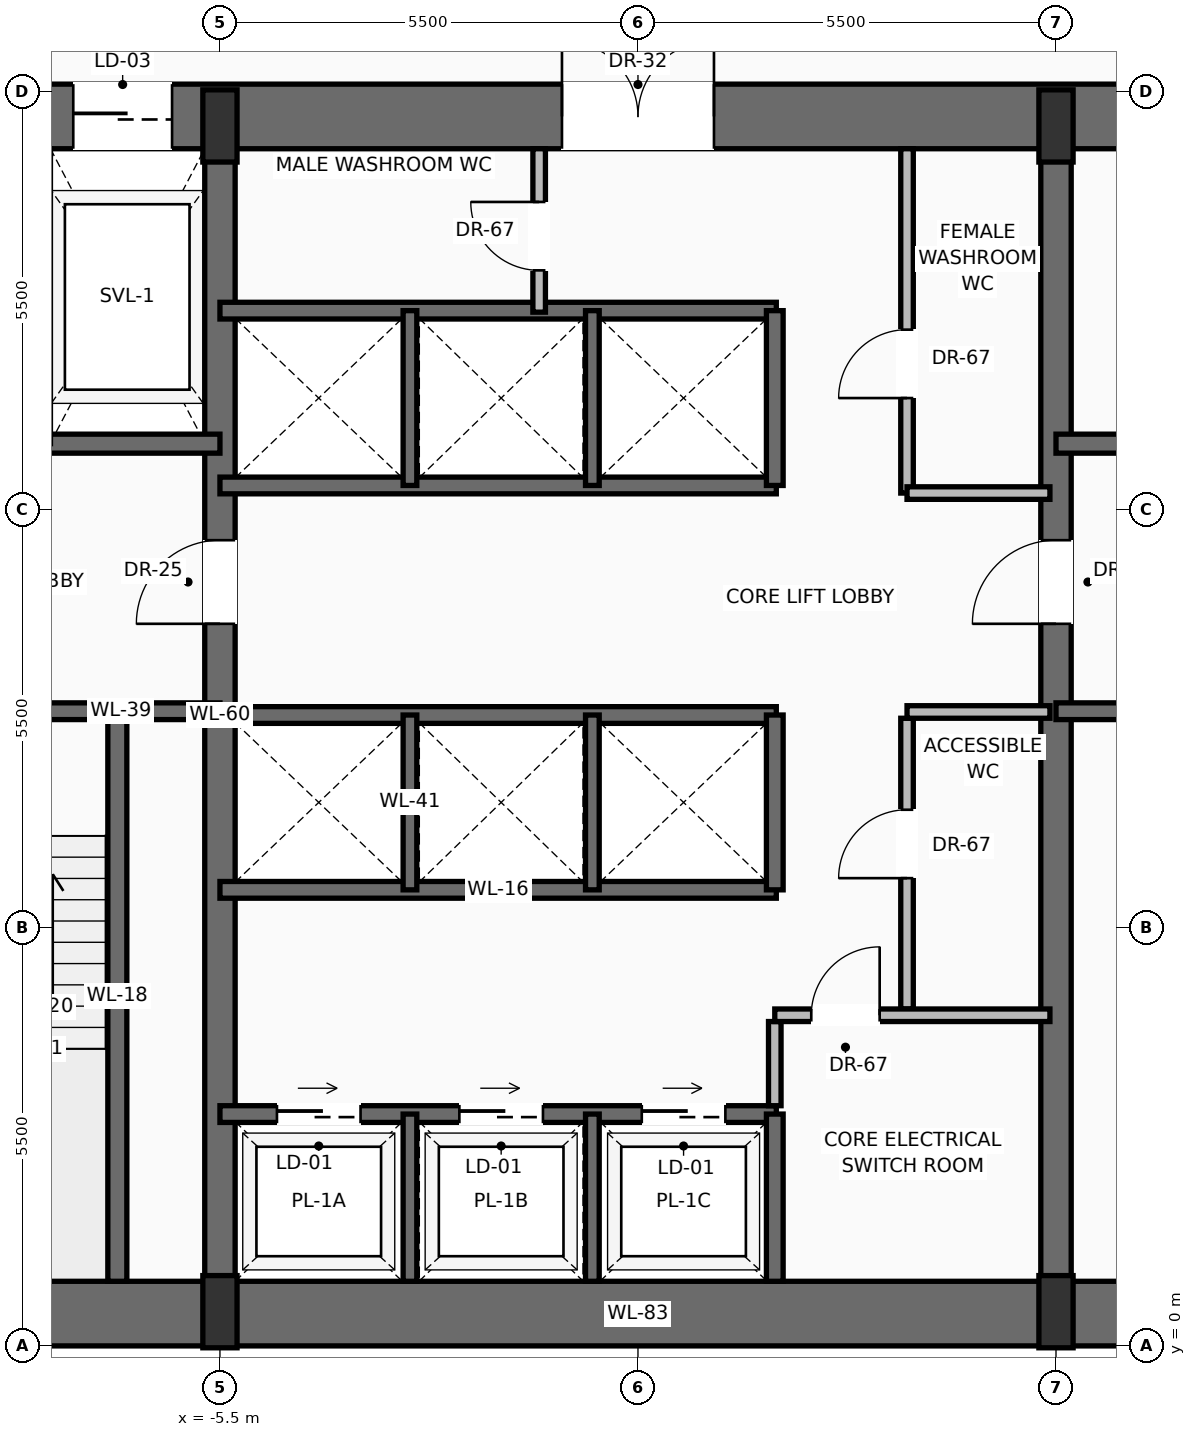
"""IFC4 building model, lengths in metres.
Left out: names, types, materials, properties, quantities, classifications, styles, units other than length and angle.
Written with IfcOpenShell. Run it as: python <this file> out.ifc"""

import sys

from ifc_helpers import new_model, si_unit, direction, frame, frame_2d, origin, origin_2d, place, context, subcontext, project, spatial, rectangle, extrude, source, transform, mapped, element, fill, save


model = new_model("IFC4")
c1 = context("Model", 3, precision=1e-05, world=origin(), true_north=direction((0.0, 1.0)))
c2 = subcontext(c1, "Body", "Model", "MODEL_VIEW")
j1 = project(units=[si_unit("LENGTHUNIT", "METRE"), si_unit("PLANEANGLEUNIT", "RADIAN")], contexts=[c1])
p1 = place(None, origin())
s1 = spatial("IfcSite", under=j1, at=p1, CompositionType="ELEMENT")
p2 = place(p1, origin())
s2 = spatial("IfcBuilding", under=s1, at=p2, CompositionType="ELEMENT")
p3 = place(p2, frame((0.0, 0.0, 49.7)))
s3 = spatial("IfcBuildingStorey", under=s2, at=p3, CompositionType="ELEMENT", Elevation=49.7)
p4 = place(p3, frame((-10.65, 0.425, 0.0), z_axis=(0.0, 0.0, 1.0), x_axis=(1.0, 0.0, 0.0)))
e1 = element("IfcWall", 1, at=p4, inside=s3, PredefinedType="SHEAR", context=c2, shape_type="SweptSolid", body=[
    extrude(rectangle(XDim=21.3, YDim=0.85, at=frame_2d((10.65, 0.0))), origin(), (0.0, 0.0, 1.0), 3.45),
])
p5 = place(p3, frame((-11.0, 16.175, 0.0), z_axis=(0.0, 0.0, 1.0), x_axis=(1.0, 0.0, 0.0)))
e2 = element("IfcWall", 2, at=p5, inside=s3, PredefinedType="SHEAR", context=c2, shape_type="SweptSolid", body=[
    extrude(rectangle(XDim=22.0, YDim=0.85, at=frame_2d((11.0, 0.0))), origin(), (0.0, 0.0, 1.0), 3.45),
])
p6 = place(p5, frame((3.57, 0.0, 0.0)))
e3 = element("IfcOpeningElement", 3, at=p6, cuts=e2, PredefinedType="OPENING", context=c2, shape_type="SweptSolid", body=[
    extrude(rectangle(XDim=1.3, YDim=2.3, at=frame_2d((0.65, 1.15))), frame((0.0, 0.435, 0.0), z_axis=(0.0, -1.0, 0.0), x_axis=(1.0, 0.0, 0.0)), (0.0, 0.0, 1.0), 0.87),
])
p7 = place(p5, frame((10.0, 0.0, 0.0)))
e4 = element("IfcOpeningElement", 4, at=p7, cuts=e2, PredefinedType="OPENING", context=c2, shape_type="SweptSolid", body=[
    extrude(rectangle(XDim=2.0, YDim=2.4, at=frame_2d((1.0, 1.2))), frame((0.0, 0.435, 0.0), z_axis=(0.0, -1.0, 0.0), x_axis=(1.0, 0.0, 0.0)), (0.0, 0.0, 1.0), 0.87),
])
p8 = place(p3, frame((-5.5, 0.425, 0.0), z_axis=(0.0, 0.0, 1.0), x_axis=(0.0, 1.0, 0.0)))
e5 = element("IfcWall", 5, at=p8, inside=s3, PredefinedType="SHEAR", context=c2, shape_type="SweptSolid", body=[
    extrude(rectangle(XDim=15.75, YDim=0.4, at=frame_2d((7.875, 0.0))), origin(), (0.0, 0.0, 1.0), 3.45),
])
p9 = place(p8, frame((9.075, 0.0, 0.0)))
e6 = element("IfcOpeningElement", 6, at=p9, cuts=e5, PredefinedType="OPENING", context=c2, shape_type="SweptSolid", body=[
    extrude(rectangle(XDim=1.1, YDim=2.2, at=frame_2d((0.55, 1.1))), frame((0.0, 0.21, 0.0), z_axis=(0.0, -1.0, 0.0), x_axis=(1.0, 0.0, 0.0)), (0.0, 0.0, 1.0), 0.42),
])
p10 = place(p3, frame((5.5, 0.425, 0.0), z_axis=(0.0, 0.0, 1.0), x_axis=(0.0, 1.0, 0.0)))
e7 = element("IfcWall", 7, at=p10, inside=s3, PredefinedType="SHEAR", context=c2, shape_type="SweptSolid", body=[
    extrude(rectangle(XDim=15.75, YDim=0.4, at=frame_2d((7.875, 0.0))), origin(), (0.0, 0.0, 1.0), 3.45),
])
p11 = place(p10, frame((9.075, 0.0, 0.0)))
e8 = element("IfcOpeningElement", 8, at=p11, cuts=e7, PredefinedType="OPENING", context=c2, shape_type="SweptSolid", body=[
    extrude(rectangle(XDim=1.1, YDim=2.2, at=frame_2d((0.55, 1.1))), frame((0.0, 0.21, 0.0), z_axis=(0.0, -1.0, 0.0), x_axis=(1.0, 0.0, 0.0)), (0.0, 0.0, 1.0), 0.42),
])
m1 = source(origin(), c2, "Body", "SweptSolid", [
    extrude(rectangle(XDim=0.45, YDim=0.95, at=origin_2d()), origin(), (0.0, 0.0, 1.0), 3.7),
])
for number, where, z_axis, x_axis in (
    (9, (-5.5, 0.45, 0.0), (0.0, 0.0, 1.0), (1.0, 0.0, 0.0)),
    (10, (5.5, 0.45, 0.0), (0.0, 0.0, 1.0), (1.0, 0.0, 0.0)),
    (11, (-5.5, 16.05, 0.0), (0.0, 0.0, 1.0), (1.0, 0.0, 0.0)),
    (12, (5.5, 16.05, 0.0), (0.0, 0.0, 1.0), (1.0, 0.0, 0.0)),
):
    element("IfcColumn", number, at=place(p3, frame(where, z_axis=z_axis, x_axis=x_axis)), inside=s3, PredefinedType="PILASTER", context=c2, shape_type="MappedRepresentation", body=[
        mapped(m1, transform((0.0, 0.0, 0.0), scale=1.0)),
    ])
p12 = place(p3, frame((-6.85, 0.85, 0.0), z_axis=(0.0, 0.0, 1.0), x_axis=(0.0, 1.0, 0.0)))
e13 = element("IfcWall", 13, at=p12, inside=s3, PredefinedType="SOLIDWALL", context=c2, shape_type="SweptSolid", body=[
    extrude(rectangle(XDim=7.5, YDim=0.25, at=frame_2d((3.75, 0.0))), origin(), (0.0, 0.0, 1.0), 3.45),
])
p13 = place(p3, frame((-5.5, 8.35, 0.0), z_axis=(0.0, 0.0, 1.0), x_axis=(-1.0, 0.0, 0.0)))
e14 = element("IfcWall", 14, at=p13, inside=s3, PredefinedType="SOLIDWALL", context=c2, shape_type="SweptSolid", body=[
    extrude(rectangle(XDim=4.65, YDim=0.22, at=frame_2d((2.325, 0.0))), origin(), (0.0, 0.0, 1.0), 3.45),
])
p14 = place(p13, frame((2.5, 0.0, 0.0)))
e15 = element("IfcOpeningElement", 15, at=p14, cuts=e14, PredefinedType="OPENING", context=c2, shape_type="SweptSolid", body=[
    extrude(rectangle(XDim=1.15, YDim=2.2, at=frame_2d((0.575, 1.1))), frame((0.0, 0.12, 0.0), z_axis=(0.0, -1.0, 0.0), x_axis=(1.0, 0.0, 0.0)), (0.0, 0.0, 1.0), 0.24),
])
p15 = place(p3, frame((-5.5, 11.87, 0.0), z_axis=(0.0, 0.0, 1.0), x_axis=(-1.0, 0.0, 0.0)))
e16 = element("IfcWall", 16, at=p15, inside=s3, PredefinedType="SOLIDWALL", context=c2, shape_type="SweptSolid", body=[
    extrude(rectangle(XDim=4.65, YDim=0.25, at=frame_2d((2.325, 0.0))), origin(), (0.0, 0.0, 1.0), 3.45),
])
p16 = place(p15, frame((2.95, 0.0, 0.0)))
e17 = element("IfcOpeningElement", 17, at=p16, cuts=e16, PredefinedType="OPENING", context=c2, shape_type="SweptSolid", body=[
    extrude(rectangle(XDim=1.2, YDim=2.25, at=frame_2d((0.6, 1.125))), frame((0.0, 0.135, 0.0), z_axis=(0.0, -1.0, 0.0), x_axis=(1.0, 0.0, 0.0)), (0.0, 0.0, 1.0), 0.27),
])
p17 = place(p3, frame((10.15, 8.35, 0.0), z_axis=(0.0, 0.0, 1.0), x_axis=(-1.0, 0.0, 0.0)))
e18 = element("IfcWall", 18, at=p17, inside=s3, PredefinedType="SOLIDWALL", context=c2, shape_type="SweptSolid", body=[
    extrude(rectangle(XDim=4.65, YDim=0.22, at=frame_2d((2.325, 0.0))), origin(), (0.0, 0.0, 1.0), 3.45),
])
p18 = place(p17, frame((1.0, 0.0, 0.0)))
e19 = element("IfcOpeningElement", 19, at=p18, cuts=e18, PredefinedType="OPENING", context=c2, shape_type="SweptSolid", body=[
    extrude(rectangle(XDim=1.15, YDim=2.2, at=frame_2d((0.575, 1.1))), frame((0.0, 0.12, 0.0), z_axis=(0.0, -1.0, 0.0), x_axis=(1.0, 0.0, 0.0)), (0.0, 0.0, 1.0), 0.24),
])
p19 = place(p3, frame((10.15, 11.87, 0.0), z_axis=(0.0, 0.0, 1.0), x_axis=(-1.0, 0.0, 0.0)))
e20 = element("IfcWall", 20, at=p19, inside=s3, PredefinedType="SOLIDWALL", context=c2, shape_type="SweptSolid", body=[
    extrude(rectangle(XDim=4.65, YDim=0.25, at=frame_2d((2.325, 0.0))), origin(), (0.0, 0.0, 1.0), 3.45),
])
p20 = place(p19, frame((0.5, 0.0, 0.0)))
e21 = element("IfcOpeningElement", 21, at=p20, cuts=e20, PredefinedType="OPENING", context=c2, shape_type="SweptSolid", body=[
    extrude(rectangle(XDim=1.2, YDim=2.25, at=frame_2d((0.6, 1.125))), frame((0.0, 0.135, 0.0), z_axis=(0.0, -1.0, 0.0), x_axis=(1.0, 0.0, 0.0)), (0.0, 0.0, 1.0), 0.27),
])
p21 = place(p3, frame((-5.5, 3.05, 0.0), z_axis=(0.0, 0.0, 1.0), x_axis=(1.0, 0.0, 0.0)))
e22 = element("IfcWall", 22, at=p21, inside=s3, PredefinedType="SOLIDWALL", context=c2, shape_type="SweptSolid", body=[
    extrude(rectangle(XDim=7.32, YDim=0.22, at=frame_2d((3.66, 0.0))), origin(), (0.0, 0.0, 1.0), 3.45),
])
p22 = place(p21, frame((0.75, 0.0, 0.0)))
e23 = element("IfcOpeningElement", 23, at=p22, cuts=e22, PredefinedType="OPENING", context=c2, shape_type="SweptSolid", body=[
    extrude(rectangle(XDim=1.1, YDim=2.2, at=frame_2d((0.55, 1.1))), frame((0.0, 0.12, 0.0), z_axis=(0.0, -1.0, 0.0), x_axis=(1.0, 0.0, 0.0)), (0.0, 0.0, 1.0), 0.24),
])
p23 = place(p21, frame((3.15, 0.0, 0.0)))
e24 = element("IfcOpeningElement", 24, at=p23, cuts=e22, PredefinedType="OPENING", context=c2, shape_type="SweptSolid", body=[
    extrude(rectangle(XDim=1.1, YDim=2.2, at=frame_2d((0.55, 1.1))), frame((0.0, 0.12, 0.0), z_axis=(0.0, -1.0, 0.0), x_axis=(1.0, 0.0, 0.0)), (0.0, 0.0, 1.0), 0.24),
])
p24 = place(p21, frame((5.55, 0.0, 0.0)))
e25 = element("IfcOpeningElement", 25, at=p24, cuts=e22, PredefinedType="OPENING", context=c2, shape_type="SweptSolid", body=[
    extrude(rectangle(XDim=1.1, YDim=2.2, at=frame_2d((0.55, 1.1))), frame((0.0, 0.12, 0.0), z_axis=(0.0, -1.0, 0.0), x_axis=(1.0, 0.0, 0.0)), (0.0, 0.0, 1.0), 0.24),
])
p25 = place(p3, frame((1.8, 0.85, 0.0), z_axis=(0.0, 0.0, 1.0), x_axis=(0.0, 1.0, 0.0)))
e26 = element("IfcWall", 26, at=p25, inside=s3, PredefinedType="SOLIDWALL", context=c2, shape_type="SweptSolid", body=[
    extrude(rectangle(XDim=2.2, YDim=0.22, at=frame_2d((1.1, 0.0))), origin(), (0.0, 0.0, 1.0), 3.45),
])
for number, where, z_axis, x_axis in (
    (27, (-3.0, 0.85, 0.0), (0.0, 0.0, 1.0), (0.0, 1.0, 0.0)),
    (28, (-0.6, 0.85, 0.0), (0.0, 0.0, 1.0), (0.0, 1.0, 0.0)),
):
    element("IfcWall", number, at=place(p3, frame(where, z_axis=z_axis, x_axis=x_axis)), inside=s3, PredefinedType="SOLIDWALL", context=c2, shape_type="SweptSolid", body=[
        extrude(rectangle(XDim=2.2, YDim=0.18, at=frame_2d((1.1, 0.0))), origin(), (0.0, 0.0, 1.0), 3.45),
    ])
p26 = place(p3, frame((1.8, 3.16, 0.0), z_axis=(0.0, 0.0, 1.0), x_axis=(0.0, 1.0, 0.0)))
e29 = element("IfcWall", 29, at=p26, inside=s3, PredefinedType="PARTITIONING", context=c2, shape_type="SweptSolid", body=[
    extrude(rectangle(XDim=1.108, YDim=0.165, at=frame_2d((0.554, 0.0))), origin(), (0.0, 0.0, 1.0), 3.442),
])
p27 = place(p3, frame((3.54, 4.433, 0.0), z_axis=(0.0, 0.0, 1.0), x_axis=(0.0, 1.0, 0.0)))
e30 = element("IfcWall", 30, at=p27, inside=s3, PredefinedType="PARTITIONING", context=c2, shape_type="SweptSolid", body=[
    extrude(rectangle(XDim=3.825, YDim=0.165, at=frame_2d((1.913, 0.0))), origin(), (0.0, 0.0, 1.0), 3.442),
])
p28 = place(p27, frame((1.721, 0.0, 0.0)))
e31 = element("IfcOpeningElement", 31, at=p28, cuts=e30, PredefinedType="OPENING", context=c2, shape_type="SweptSolid", body=[
    extrude(rectangle(XDim=0.9, YDim=2.1, at=frame_2d((0.45, 1.05))), frame((0.0, 0.093, 0.0), z_axis=(0.0, -1.0, 0.0), x_axis=(1.0, 0.0, 0.0)), (0.0, 0.0, 1.0), 0.185),
])
p29 = place(p3, frame((3.54, 8.34, 0.0), z_axis=(0.0, 0.0, 1.0), x_axis=(1.0, 0.0, 0.0)))
e32 = element("IfcWall", 32, at=p29, inside=s3, PredefinedType="PARTITIONING", context=c2, shape_type="SweptSolid", body=[
    extrude(rectangle(XDim=1.88, YDim=0.165, at=frame_2d((0.94, 0.0))), origin(), (0.0, 0.0, 1.0), 3.442),
])
p30 = place(p3, frame((1.8, 4.35, 0.0), z_axis=(0.0, 0.0, 1.0), x_axis=(1.0, 0.0, 0.0)))
e33 = element("IfcWall", 33, at=p30, inside=s3, PredefinedType="PARTITIONING", context=c2, shape_type="SweptSolid", body=[
    extrude(rectangle(XDim=3.62, YDim=0.165, at=frame_2d((1.81, 0.0))), origin(), (0.0, 0.0, 1.0), 3.442),
])
p31 = place(p30, frame((0.48, 0.0, 0.0)))
e34 = element("IfcOpeningElement", 34, at=p31, cuts=e33, PredefinedType="OPENING", context=c2, shape_type="SweptSolid", body=[
    extrude(rectangle(XDim=0.9, YDim=2.1, at=frame_2d((0.45, 1.05))), frame((0.0, 0.093, 0.0), z_axis=(0.0, -1.0, 0.0), x_axis=(1.0, 0.0, 0.0)), (0.0, 0.0, 1.0), 0.185),
])
for number, where, z_axis, x_axis in (
    (35, (-5.5, 6.0, 0.0), (0.0, 0.0, 1.0), (1.0, 0.0, 0.0)),
    (36, (-5.5, 8.3, 0.0), (0.0, 0.0, 1.0), (1.0, 0.0, 0.0)),
):
    element("IfcWall", number, at=place(p3, frame(where, z_axis=z_axis, x_axis=x_axis)), inside=s3, PredefinedType="SOLIDWALL", context=c2, shape_type="SweptSolid", body=[
        extrude(rectangle(XDim=7.32, YDim=0.22, at=frame_2d((3.66, 0.0))), origin(), (0.0, 0.0, 1.0), 3.45),
    ])
p32 = place(p3, frame((1.8, 6.0, 0.0), z_axis=(0.0, 0.0, 1.0), x_axis=(0.0, 1.0, 0.0)))
e37 = element("IfcWall", 37, at=p32, inside=s3, PredefinedType="SOLIDWALL", context=c2, shape_type="SweptSolid", body=[
    extrude(rectangle(XDim=2.3, YDim=0.22, at=frame_2d((1.15, 0.0))), origin(), (0.0, 0.0, 1.0), 3.45),
])
for number, where, z_axis, x_axis in (
    (38, (-3.0, 6.0, 0.0), (0.0, 0.0, 1.0), (0.0, 1.0, 0.0)),
    (39, (-0.6, 6.0, 0.0), (0.0, 0.0, 1.0), (0.0, 1.0, 0.0)),
):
    element("IfcWall", number, at=place(p3, frame(where, z_axis=z_axis, x_axis=x_axis)), inside=s3, PredefinedType="SOLIDWALL", context=c2, shape_type="SweptSolid", body=[
        extrude(rectangle(XDim=2.3, YDim=0.18, at=frame_2d((1.15, 0.0))), origin(), (0.0, 0.0, 1.0), 3.45),
    ])
for number, where, z_axis, x_axis in (
    (40, (-5.5, 11.32, 0.0), (0.0, 0.0, 1.0), (1.0, 0.0, 0.0)),
    (41, (-5.5, 13.62, 0.0), (0.0, 0.0, 1.0), (1.0, 0.0, 0.0)),
):
    element("IfcWall", number, at=place(p3, frame(where, z_axis=z_axis, x_axis=x_axis)), inside=s3, PredefinedType="SOLIDWALL", context=c2, shape_type="SweptSolid", body=[
        extrude(rectangle(XDim=7.32, YDim=0.22, at=frame_2d((3.66, 0.0))), origin(), (0.0, 0.0, 1.0), 3.45),
    ])
p33 = place(p3, frame((1.8, 11.32, 0.0), z_axis=(0.0, 0.0, 1.0), x_axis=(0.0, 1.0, 0.0)))
e42 = element("IfcWall", 42, at=p33, inside=s3, PredefinedType="SOLIDWALL", context=c2, shape_type="SweptSolid", body=[
    extrude(rectangle(XDim=2.3, YDim=0.22, at=frame_2d((1.15, 0.0))), origin(), (0.0, 0.0, 1.0), 3.45),
])
for number, where, z_axis, x_axis in (
    (43, (-3.0, 11.32, 0.0), (0.0, 0.0, 1.0), (0.0, 1.0, 0.0)),
    (44, (-0.6, 11.32, 0.0), (0.0, 0.0, 1.0), (0.0, 1.0, 0.0)),
):
    element("IfcWall", number, at=place(p3, frame(where, z_axis=z_axis, x_axis=x_axis)), inside=s3, PredefinedType="SOLIDWALL", context=c2, shape_type="SweptSolid", body=[
        extrude(rectangle(XDim=2.3, YDim=0.18, at=frame_2d((1.15, 0.0))), origin(), (0.0, 0.0, 1.0), 3.45),
    ])
p34 = place(p3, frame((-1.3, 13.6, 0.0), z_axis=(0.0, 0.0, 1.0), x_axis=(0.0, 1.0, 0.0)))
e45 = element("IfcWall", 45, at=p34, inside=s3, PredefinedType="PARTITIONING", context=c2, shape_type="SweptSolid", body=[
    extrude(rectangle(XDim=2.15, YDim=0.165, at=frame_2d((1.075, 0.0))), origin(), (0.0, 0.0, 1.0), 3.442),
])
p35 = place(p34, frame((0.55, 0.0, 0.0)))
e46 = element("IfcOpeningElement", 46, at=p35, cuts=e45, PredefinedType="OPENING", context=c2, shape_type="SweptSolid", body=[
    extrude(rectangle(XDim=0.9, YDim=2.1, at=frame_2d((0.45, 1.05))), frame((0.0, 0.093, 0.0), z_axis=(0.0, -1.0, 0.0), x_axis=(1.0, 0.0, 0.0)), (0.0, 0.0, 1.0), 0.185),
])
p36 = place(p3, frame((3.54, 11.22, 0.0), z_axis=(0.0, 0.0, 1.0), x_axis=(0.0, 1.0, 0.0)))
e47 = element("IfcWall", 47, at=p36, inside=s3, PredefinedType="PARTITIONING", context=c2, shape_type="SweptSolid", body=[
    extrude(rectangle(XDim=4.53, YDim=0.165, at=frame_2d((2.265, 0.0))), origin(), (0.0, 0.0, 1.0), 3.442),
])
p37 = place(p36, frame((1.25, 0.0, 0.0)))
e48 = element("IfcOpeningElement", 48, at=p37, cuts=e47, PredefinedType="OPENING", context=c2, shape_type="SweptSolid", body=[
    extrude(rectangle(XDim=0.9, YDim=2.1, at=frame_2d((0.45, 1.05))), frame((0.0, 0.093, 0.0), z_axis=(0.0, -1.0, 0.0), x_axis=(1.0, 0.0, 0.0)), (0.0, 0.0, 1.0), 0.185),
])
p38 = place(p3, frame((3.54, 11.22, 0.0), z_axis=(0.0, 0.0, 1.0), x_axis=(1.0, 0.0, 0.0)))
e49 = element("IfcWall", 49, at=p38, inside=s3, PredefinedType="PARTITIONING", context=c2, shape_type="SweptSolid", body=[
    extrude(rectangle(XDim=1.88, YDim=0.165, at=frame_2d((0.94, 0.0))), origin(), (0.0, 0.0, 1.0), 3.442),
])
m2 = source(origin(), c2, "Body", "SweptSolid", [
    extrude(rectangle(XDim=1.1, YDim=2.2, at=frame_2d((0.55, 1.1))), frame((0.0, 0.025, 0.0), z_axis=(0.0, -1.0, 0.0), x_axis=(1.0, 0.0, 0.0)), (0.0, 0.0, 1.0), 0.05),
])
p39 = place(p9, origin())
e50 = element("IfcDoor", 50, at=p39, inside=s3, OperationType="SINGLE_SWING_LEFT", PredefinedType="DOOR", context=c2, shape_type="MappedRepresentation", body=[
    mapped(m2, transform((0.0, 0.0, 0.0), scale=1.0)),
])
fill(e6, e50)
m3 = source(origin(), c2, "Body", "SweptSolid", [
    extrude(rectangle(XDim=1.3, YDim=2.3, at=frame_2d((0.65, 1.15))), frame((0.0, 0.025, 0.0), z_axis=(0.0, -1.0, 0.0), x_axis=(1.0, 0.0, 0.0)), (0.0, 0.0, 1.0), 0.05),
])
p40 = place(p6, origin())
e51 = element("IfcDoor", 51, at=p40, inside=s3, OperationType="SLIDING_TO_RIGHT", PredefinedType="DOOR", context=c2, shape_type="MappedRepresentation", body=[
    mapped(m3, transform((0.0, 0.0, 0.0), scale=1.0)),
])
fill(e3, e51)
p41 = place(p11, origin())
e52 = element("IfcDoor", 52, at=p41, inside=s3, OperationType="SINGLE_SWING_LEFT", PredefinedType="DOOR", context=c2, shape_type="MappedRepresentation", body=[
    mapped(m2, transform((0.0, 0.0, 0.0), scale=1.0)),
])
fill(e8, e52)
m4 = source(origin(), c2, "Body", "SweptSolid", [
    extrude(rectangle(XDim=2.0, YDim=2.4, at=frame_2d((1.0, 1.2))), frame((0.0, 0.025, 0.0), z_axis=(0.0, -1.0, 0.0), x_axis=(1.0, 0.0, 0.0)), (0.0, 0.0, 1.0), 0.05),
])
p42 = place(p7, origin())
e53 = element("IfcDoor", 53, at=p42, inside=s3, OperationType="DOUBLE_DOOR_SINGLE_SWING", PredefinedType="DOOR", context=c2, shape_type="MappedRepresentation", body=[
    mapped(m4, transform((0.0, 0.0, 0.0), scale=1.0)),
])
fill(e4, e53)
m5 = source(origin(), c2, "Body", "SweptSolid", [
    extrude(rectangle(XDim=1.1, YDim=2.2, at=frame_2d((0.55, 1.1))), frame((0.0, 0.025, 0.0), z_axis=(0.0, -1.0, 0.0), x_axis=(1.0, 0.0, 0.0)), (0.0, 0.0, 1.0), 0.05),
])
p43 = place(p22, origin())
e54 = element("IfcDoor", 54, at=p43, inside=s3, OperationType="SLIDING_TO_RIGHT", PredefinedType="DOOR", context=c2, shape_type="MappedRepresentation", body=[
    mapped(m5, transform((0.0, 0.0, 0.0), scale=1.0)),
])
fill(e23, e54)
p44 = place(p23, origin())
e55 = element("IfcDoor", 55, at=p44, inside=s3, OperationType="SLIDING_TO_RIGHT", PredefinedType="DOOR", context=c2, shape_type="MappedRepresentation", body=[
    mapped(m5, transform((0.0, 0.0, 0.0), scale=1.0)),
])
fill(e24, e55)
p45 = place(p24, origin())
e56 = element("IfcDoor", 56, at=p45, inside=s3, OperationType="SLIDING_TO_RIGHT", PredefinedType="DOOR", context=c2, shape_type="MappedRepresentation", body=[
    mapped(m5, transform((0.0, 0.0, 0.0), scale=1.0)),
])
fill(e25, e56)
m6 = source(origin(), c2, "Body", "SweptSolid", [
    extrude(rectangle(XDim=0.9, YDim=2.1, at=frame_2d((0.45, 1.05))), frame((0.0, 0.025, 0.0), z_axis=(0.0, -1.0, 0.0), x_axis=(1.0, 0.0, 0.0)), (0.0, 0.0, 1.0), 0.05),
])
p46 = place(p31, origin())
e57 = element("IfcDoor", 57, at=p46, inside=s3, OperationType="SINGLE_SWING_RIGHT", PredefinedType="DOOR", context=c2, shape_type="MappedRepresentation", body=[
    mapped(m6, transform((0.0, 0.0, 0.0), scale=1.0)),
])
fill(e34, e57)
p47 = place(p28, origin())
e58 = element("IfcDoor", 58, at=p47, inside=s3, OperationType="SINGLE_SWING_LEFT", PredefinedType="DOOR", context=c2, shape_type="MappedRepresentation", body=[
    mapped(m6, transform((0.0, 0.0, 0.0), scale=1.0)),
])
fill(e31, e58)
p48 = place(p35, origin())
e59 = element("IfcDoor", 59, at=p48, inside=s3, OperationType="SINGLE_SWING_RIGHT", PredefinedType="DOOR", context=c2, shape_type="MappedRepresentation", body=[
    mapped(m6, transform((0.0, 0.0, 0.0), scale=1.0)),
])
fill(e46, e59)
p49 = place(p37, origin())
e60 = element("IfcDoor", 60, at=p49, inside=s3, OperationType="SINGLE_SWING_LEFT", PredefinedType="DOOR", context=c2, shape_type="MappedRepresentation", body=[
    mapped(m6, transform((0.0, 0.0, 0.0), scale=1.0)),
])
fill(e48, e60)
save(model, sys.argv[1])
